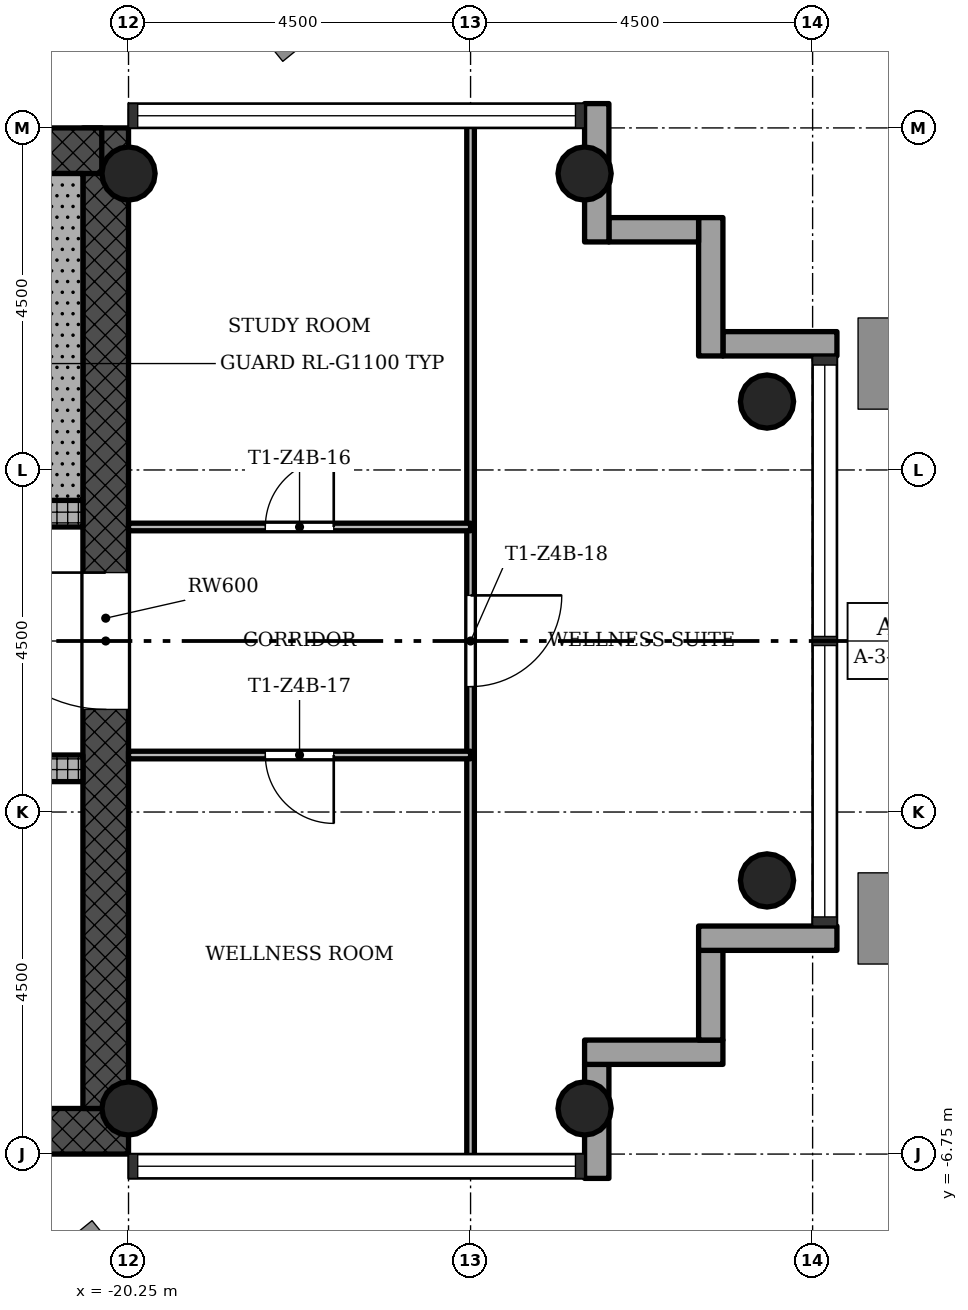
"""IFC4 building model, lengths in metres.
Left out: names, types, materials, properties, quantities, classifications, styles, units other than length and angle.
Written with IfcOpenShell. Run it as: python <this file> out.ifc"""

import sys

from ifc_helpers import new_model, si_unit, direction, frame, frame_2d, origin, origin_2d, place, context, subcontext, project, spatial, rectangle, hollow_circle, extrude, element, fill, save


model = new_model("IFC4")
c1 = context("Model", 3, precision=1e-05, world=origin(), true_north=direction((0.0, 1.0)))
c2 = subcontext(c1, "Body", "Model", "MODEL_VIEW")
j1 = project(units=[si_unit("LENGTHUNIT", "METRE"), si_unit("PLANEANGLEUNIT", "RADIAN")], contexts=[c1])
p1 = place(None, origin())
s1 = spatial("IfcSite", under=j1, at=p1, CompositionType="ELEMENT")
p2 = place(p1, origin())
s2 = spatial("IfcBuilding", under=s1, at=p2, CompositionType="ELEMENT")
p3 = place(p2, frame((0.0, 0.0, 230.0)))
s3 = spatial("IfcBuildingStorey", under=s2, at=p3, CompositionType="ELEMENT", Elevation=230.0)
p4 = place(p3, frame((-28.65, -6.45, 0.0), z_axis=(0.0, 0.0, 1.0), x_axis=(1.0, 0.0, 0.0)))
e1 = element("IfcWall", 1, at=p4, inside=s3, PredefinedType="SHEAR", context=c2, shape_type="SweptSolid", body=[
    extrude(rectangle(XDim=8.4, YDim=0.6, at=frame_2d((4.2, 0.0))), origin(), (0.0, 0.0, 1.0), 3.4),
])
p5 = place(p3, frame((-20.55, -6.15, 0.0), z_axis=(0.0, 0.0, 1.0), x_axis=(0.0, 1.0, 0.0)))
e2 = element("IfcWall", 2, at=p5, inside=s3, PredefinedType="SHEAR", context=c2, shape_type="SweptSolid", body=[
    extrude(rectangle(XDim=12.9, YDim=0.6, at=frame_2d((6.45, 0.0))), origin(), (0.0, 0.0, 1.0), 3.4),
])
p6 = place(p5, frame((5.25, 0.0, 0.0)))
e3 = element("IfcOpeningElement", 3, at=p6, cuts=e2, PredefinedType="OPENING", context=c2, shape_type="SweptSolid", body=[
    extrude(rectangle(XDim=1.8, YDim=2.1, at=frame_2d((0.9, 1.05))), frame((0.0, 0.31, 0.0), z_axis=(0.0, -1.0, 0.0), x_axis=(1.0, 0.0, 0.0)), (0.0, 0.0, 1.0), 0.62),
])
p7 = place(p3, frame((-20.602, 6.45, 0.0), z_axis=(0.0, 0.0, 1.0), x_axis=(-1.0, 0.0, 0.0)))
e4 = element("IfcWall", 4, at=p7, inside=s3, PredefinedType="SHEAR", context=c2, shape_type="SweptSolid", body=[
    extrude(rectangle(XDim=8.896, YDim=0.6, at=frame_2d((4.448, 0.0))), origin(), (0.0, 0.0, 1.0), 3.4),
])
p8 = place(p3, frame((-28.65, -1.675, 0.0), z_axis=(0.0, 0.0, 1.0), x_axis=(1.0, 0.0, 0.0)))
e5 = element("IfcWall", 5, at=p8, inside=s3, PredefinedType="SHEAR", context=c2, shape_type="SweptSolid", body=[
    extrude(rectangle(XDim=7.8, YDim=0.35, at=frame_2d((3.9, 0.0))), origin(), (0.0, 0.0, 1.0), 3.4),
])
p9 = place(p8, frame((1.15, 0.0, 0.0)))
e6 = element("IfcOpeningElement", 6, at=p9, cuts=e5, PredefinedType="OPENING", context=c2, shape_type="SweptSolid", body=[
    extrude(rectangle(XDim=1.1, YDim=2.1, at=frame_2d((0.55, 1.05))), frame((0.0, 0.185, 0.0), z_axis=(0.0, -1.0, 0.0), x_axis=(1.0, 0.0, 0.0)), (0.0, 0.0, 1.0), 0.37),
])
p10 = place(p8, frame((3.35, 0.0, 0.0)))
e7 = element("IfcOpeningElement", 7, at=p10, cuts=e5, PredefinedType="OPENING", context=c2, shape_type="SweptSolid", body=[
    extrude(rectangle(XDim=1.1, YDim=2.1, at=frame_2d((0.55, 1.05))), frame((0.0, 0.185, 0.0), z_axis=(0.0, -1.0, 0.0), x_axis=(1.0, 0.0, 0.0)), (0.0, 0.0, 1.0), 0.37),
])
p11 = place(p8, frame((5.55, 0.0, 0.0)))
e8 = element("IfcOpeningElement", 8, at=p11, cuts=e5, PredefinedType="OPENING", context=c2, shape_type="SweptSolid", body=[
    extrude(rectangle(XDim=1.1, YDim=2.1, at=frame_2d((0.55, 1.05))), frame((0.0, 0.185, 0.0), z_axis=(0.0, -1.0, 0.0), x_axis=(1.0, 0.0, 0.0)), (0.0, 0.0, 1.0), 0.37),
])
p12 = place(p3, frame((-28.65, 1.675, 0.0), z_axis=(0.0, 0.0, 1.0), x_axis=(1.0, 0.0, 0.0)))
e9 = element("IfcWall", 9, at=p12, inside=s3, PredefinedType="SHEAR", context=c2, shape_type="SweptSolid", body=[
    extrude(rectangle(XDim=7.8, YDim=0.35, at=frame_2d((3.9, 0.0))), origin(), (0.0, 0.0, 1.0), 3.4),
])
p13 = place(p12, frame((1.05, 0.0, 0.0)))
e10 = element("IfcOpeningElement", 10, at=p13, cuts=e9, PredefinedType="OPENING", context=c2, shape_type="SweptSolid", body=[
    extrude(rectangle(XDim=0.9, YDim=2.1, at=frame_2d((0.45, 1.05))), frame((0.0, 0.185, 0.0), z_axis=(0.0, -1.0, 0.0), x_axis=(1.0, 0.0, 0.0)), (0.0, 0.0, 1.0), 0.37),
])
for number, where, z_axis, x_axis in (
    (11, (-20.25, -6.15, 0.0), (0.0, 0.0, 1.0), (1.0, 0.0, 0.0)),
    (12, (-20.25, 6.15, 0.0), (0.0, 0.0, 1.0), (1.0, 0.0, 0.0)),
    (13, (-14.25, -6.15, 0.0), (0.0, 0.0, 1.0), (1.0, 0.0, 0.0)),
    (14, (-14.25, 6.15, 0.0), (0.0, 0.0, 1.0), (1.0, 0.0, 0.0)),
    (15, (-11.85, -3.15, 0.0), (0.0, 0.0, 1.0), (1.0, 0.0, 0.0)),
    (16, (-11.85, 3.15, 0.0), (0.0, 0.0, 1.0), (1.0, 0.0, 0.0)),
):
    element("IfcColumn", number, at=place(p3, frame(where, z_axis=z_axis, x_axis=x_axis)), inside=s3, PredefinedType="COLUMN", context=c2, shape_type="SweptSolid", body=[
        extrude(hollow_circle(Radius=0.35, WallThickness=0.025, at=origin_2d()), origin(), (0.0, 0.0, 1.0), 3.4),
    ])
p14 = place(p3, frame((-14.09, -7.07, -0.3), z_axis=(0.0, 0.0, 1.0), x_axis=(0.0, 1.0, 0.0)))
e17 = element("IfcWall", 17, at=p14, inside=s3, PredefinedType="STANDARD", context=c2, shape_type="SweptSolid", body=[
    extrude(rectangle(XDim=1.5, YDim=0.32, at=frame_2d((0.75, 0.0))), origin(), (0.0, 0.0, 1.0), 3.4),
])
p15 = place(p3, frame((-14.25, -5.41, -0.3), z_axis=(0.0, 0.0, 1.0), x_axis=(1.0, 0.0, 0.0)))
e18 = element("IfcWall", 18, at=p15, inside=s3, PredefinedType="STANDARD", context=c2, shape_type="SweptSolid", body=[
    extrude(rectangle(XDim=1.82, YDim=0.32, at=frame_2d((0.91, 0.0))), origin(), (0.0, 0.0, 1.0), 3.4),
])
p16 = place(p3, frame((-12.59, -5.25, -0.3), z_axis=(0.0, 0.0, 1.0), x_axis=(0.0, 1.0, 0.0)))
e19 = element("IfcWall", 19, at=p16, inside=s3, PredefinedType="STANDARD", context=c2, shape_type="SweptSolid", body=[
    extrude(rectangle(XDim=1.18, YDim=0.32, at=frame_2d((0.59, 0.0))), origin(), (0.0, 0.0, 1.0), 3.4),
])
p17 = place(p3, frame((-12.75, -3.91, -0.3), z_axis=(0.0, 0.0, 1.0), x_axis=(1.0, 0.0, 0.0)))
e20 = element("IfcWall", 20, at=p17, inside=s3, PredefinedType="STANDARD", context=c2, shape_type="SweptSolid", body=[
    extrude(rectangle(XDim=1.82, YDim=0.32, at=frame_2d((0.91, 0.0))), origin(), (0.0, 0.0, 1.0), 3.4),
])
p18 = place(p3, frame((-10.93, 3.91, -0.3), z_axis=(0.0, 0.0, 1.0), x_axis=(-1.0, 0.0, 0.0)))
e21 = element("IfcWall", 21, at=p18, inside=s3, PredefinedType="STANDARD", context=c2, shape_type="SweptSolid", body=[
    extrude(rectangle(XDim=1.5, YDim=0.32, at=frame_2d((0.75, 0.0))), origin(), (0.0, 0.0, 1.0), 3.4),
])
p19 = place(p3, frame((-12.59, 3.75, -0.3), z_axis=(0.0, 0.0, 1.0), x_axis=(0.0, 1.0, 0.0)))
e22 = element("IfcWall", 22, at=p19, inside=s3, PredefinedType="STANDARD", context=c2, shape_type="SweptSolid", body=[
    extrude(rectangle(XDim=1.82, YDim=0.32, at=frame_2d((0.91, 0.0))), origin(), (0.0, 0.0, 1.0), 3.4),
])
p20 = place(p3, frame((-12.75, 5.41, -0.3), z_axis=(0.0, 0.0, 1.0), x_axis=(-1.0, 0.0, 0.0)))
e23 = element("IfcWall", 23, at=p20, inside=s3, PredefinedType="STANDARD", context=c2, shape_type="SweptSolid", body=[
    extrude(rectangle(XDim=1.18, YDim=0.32, at=frame_2d((0.59, 0.0))), origin(), (0.0, 0.0, 1.0), 3.4),
])
p21 = place(p3, frame((-14.09, 5.25, -0.3), z_axis=(0.0, 0.0, 1.0), x_axis=(0.0, 1.0, 0.0)))
e24 = element("IfcWall", 24, at=p21, inside=s3, PredefinedType="STANDARD", context=c2, shape_type="SweptSolid", body=[
    extrude(rectangle(XDim=1.82, YDim=0.32, at=frame_2d((0.91, 0.0))), origin(), (0.0, 0.0, 1.0), 3.4),
])
p22 = place(p3, frame((-15.75, -6.85, 0.0), z_axis=(0.0, 0.0, 1.0), x_axis=(0.0, 1.0, 0.0)))
e25 = element("IfcWall", 25, at=p22, inside=s3, PredefinedType="PARTITIONING", context=c2, shape_type="SweptSolid", body=[
    extrude(rectangle(XDim=13.7, YDim=0.1, at=frame_2d((6.85, 0.0))), origin(), (0.0, 0.0, 1.0), 2.98),
])
p23 = place(p22, frame((6.25, 0.0, 0.0)))
e26 = element("IfcOpeningElement", 26, at=p23, cuts=e25, PredefinedType="OPENING", context=c2, shape_type="SweptSolid", body=[
    extrude(rectangle(XDim=1.2, YDim=2.1, at=frame_2d((0.6, 1.05))), frame((0.0, 0.06, 0.0), z_axis=(0.0, -1.0, 0.0), x_axis=(1.0, 0.0, 0.0)), (0.0, 0.0, 1.0), 0.12),
])
p24 = place(p3, frame((-20.25, -1.5, 0.0), z_axis=(0.0, 0.0, 1.0), x_axis=(1.0, 0.0, 0.0)))
e27 = element("IfcWall", 27, at=p24, inside=s3, PredefinedType="PARTITIONING", context=c2, shape_type="SweptSolid", body=[
    extrude(rectangle(XDim=4.5, YDim=0.1, at=frame_2d((2.25, 0.0))), origin(), (0.0, 0.0, 1.0), 2.98),
])
p25 = place(p24, frame((1.8, 0.0, 0.0)))
e28 = element("IfcOpeningElement", 28, at=p25, cuts=e27, PredefinedType="OPENING", context=c2, shape_type="SweptSolid", body=[
    extrude(rectangle(XDim=0.9, YDim=2.1, at=frame_2d((0.45, 1.05))), frame((0.0, 0.06, 0.0), z_axis=(0.0, -1.0, 0.0), x_axis=(1.0, 0.0, 0.0)), (0.0, 0.0, 1.0), 0.12),
])
p26 = place(p3, frame((-20.25, 1.5, 0.0), z_axis=(0.0, 0.0, 1.0), x_axis=(1.0, 0.0, 0.0)))
e29 = element("IfcWall", 29, at=p26, inside=s3, PredefinedType="PARTITIONING", context=c2, shape_type="SweptSolid", body=[
    extrude(rectangle(XDim=4.5, YDim=0.1, at=frame_2d((2.25, 0.0))), origin(), (0.0, 0.0, 1.0), 2.98),
])
p27 = place(p26, frame((1.8, 0.0, 0.0)))
e30 = element("IfcOpeningElement", 30, at=p27, cuts=e29, PredefinedType="OPENING", context=c2, shape_type="SweptSolid", body=[
    extrude(rectangle(XDim=0.9, YDim=2.1, at=frame_2d((0.45, 1.05))), frame((0.0, 0.06, 0.0), z_axis=(0.0, -1.0, 0.0), x_axis=(1.0, 0.0, 0.0)), (0.0, 0.0, 1.0), 0.12),
])
p28 = place(p3, frame((-21.15, 1.85, 0.0), z_axis=(0.0, 0.0, 1.0), x_axis=(0.0, 1.0, 0.0)))
e31 = element("IfcWall", 31, at=p28, inside=s3, PredefinedType="SHEAR", context=c2, shape_type="SweptSolid", body=[
    extrude(rectangle(XDim=4.3, YDim=0.6, at=frame_2d((2.15, 0.0))), origin(), (0.0, 0.0, 1.0), 3.4),
])
p29 = place(p27, origin())
e32 = element("IfcDoor", 32, at=p29, inside=s3, OperationType="SINGLE_SWING_LEFT", PredefinedType="DOOR", context=c2, shape_type="SweptSolid", body=[
    extrude(rectangle(XDim=0.9, YDim=2.1, at=frame_2d((0.45, 1.05))), frame((0.0, 0.025, 0.0), z_axis=(0.0, -1.0, 0.0), x_axis=(1.0, 0.0, 0.0)), (0.0, 0.0, 1.0), 0.05),
])
fill(e30, e32)
p30 = place(p25, origin())
e33 = element("IfcDoor", 33, at=p30, inside=s3, OperationType="SINGLE_SWING_RIGHT", PredefinedType="DOOR", context=c2, shape_type="SweptSolid", body=[
    extrude(rectangle(XDim=0.9, YDim=2.1, at=frame_2d((0.45, 1.05))), frame((0.0, 0.025, 0.0), z_axis=(0.0, -1.0, 0.0), x_axis=(1.0, 0.0, 0.0)), (0.0, 0.0, 1.0), 0.05),
])
fill(e28, e33)
p31 = place(p23, origin())
e34 = element("IfcDoor", 34, at=p31, inside=s3, OperationType="SINGLE_SWING_RIGHT", PredefinedType="DOOR", context=c2, shape_type="SweptSolid", body=[
    extrude(rectangle(XDim=1.2, YDim=2.1, at=frame_2d((0.6, 1.05))), frame((0.0, 0.025, 0.0), z_axis=(0.0, -1.0, 0.0), x_axis=(1.0, 0.0, 0.0)), (0.0, 0.0, 1.0), 0.05),
])
fill(e26, e34)
p32 = place(p6, origin())
e35 = element("IfcDoor", 35, at=p32, inside=s3, OperationType="SINGLE_SWING_LEFT", PredefinedType="DOOR", context=c2, shape_type="SweptSolid", body=[
    extrude(rectangle(XDim=1.8, YDim=2.1, at=frame_2d((0.9, 1.05))), frame((0.0, 0.025, 0.0), z_axis=(0.0, -1.0, 0.0), x_axis=(1.0, 0.0, 0.0)), (0.0, 0.0, 1.0), 0.05),
])
fill(e3, e35)
save(model, sys.argv[1])
